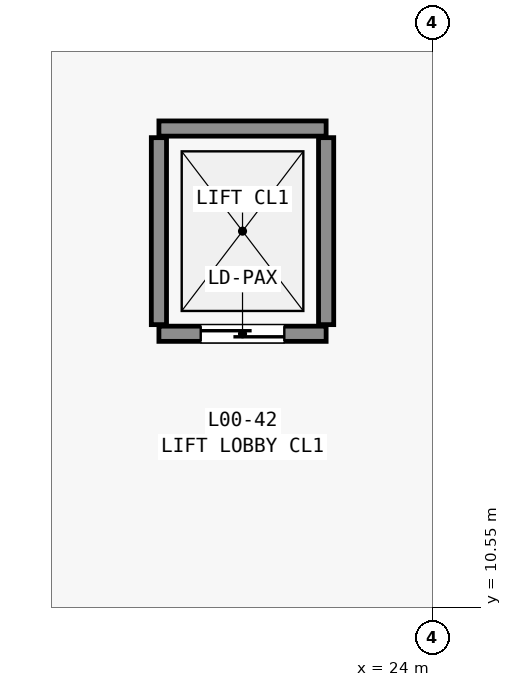
"""IFC4 building model, lengths in metres.
Left out: names, types, materials, properties, quantities, classifications, styles, units other than length and angle.
Written with IfcOpenShell. Run it as: python <this file> out.ifc"""

import sys

from ifc_helpers import new_model, si_unit, direction, frame, frame_2d, origin, place, context, subcontext, project, spatial, rectangle, extrude, element, fill, save


model = new_model("IFC4")
c1 = context("Model", 3, precision=1e-05, world=origin(), true_north=direction((0.0, 1.0)))
c2 = subcontext(c1, "Body", "Model", "MODEL_VIEW")
j1 = project(units=[si_unit("LENGTHUNIT", "METRE"), si_unit("PLANEANGLEUNIT", "RADIAN")], contexts=[c1])
p1 = place(None, origin())
s1 = spatial("IfcSite", under=j1, at=p1, CompositionType="ELEMENT")
p2 = place(p1, origin())
s2 = spatial("IfcBuilding", under=s1, at=p2, CompositionType="ELEMENT")
p3 = place(p2, origin())
s3 = spatial("IfcBuildingStorey", under=s2, at=p3, CompositionType="ELEMENT", Elevation=0.0)
p4 = place(p3, frame((20.4, 14.15, 0.0), z_axis=(0.0, 0.0, 1.0), x_axis=(1.0, 0.0, 0.0)))
e1 = element("IfcWall", 1, at=p4, inside=s3, PredefinedType="STANDARD", context=c2, shape_type="SweptSolid", body=[
    extrude(rectangle(XDim=2.2, YDim=0.2, at=frame_2d((1.1, 0.0))), origin(), (0.0, 0.0, 1.0), 5.64),
])
p5 = place(p4, frame((0.55, 0.0, 0.0)))
e2 = element("IfcOpeningElement", 2, at=p5, cuts=e1, PredefinedType="OPENING", context=c2, shape_type="SweptSolid", body=[
    extrude(rectangle(XDim=1.1, YDim=2.15, at=frame_2d((0.55, 1.075))), frame((0.0, 0.11, 0.0), z_axis=(0.0, -1.0, 0.0), x_axis=(1.0, 0.0, 0.0)), (0.0, 0.0, 1.0), 0.22),
])
p6 = place(p3, frame((20.4, 16.85, 0.0), z_axis=(0.0, 0.0, 1.0), x_axis=(1.0, 0.0, 0.0)))
e3 = element("IfcWall", 3, at=p6, inside=s3, PredefinedType="STANDARD", context=c2, shape_type="SweptSolid", body=[
    extrude(rectangle(XDim=2.2, YDim=0.2, at=frame_2d((1.1, 0.0))), origin(), (0.0, 0.0, 1.0), 5.64),
])
for number, where, z_axis, x_axis in (
    (4, (20.4, 14.27, 0.0), (0.0, 0.0, 1.0), (0.0, 1.0, 0.0)),
    (5, (22.6, 14.27, 0.0), (0.0, 0.0, 1.0), (0.0, 1.0, 0.0)),
):
    element("IfcWall", number, at=place(p3, frame(where, z_axis=z_axis, x_axis=x_axis)), inside=s3, PredefinedType="STANDARD", context=c2, shape_type="SweptSolid", body=[
        extrude(rectangle(XDim=2.46, YDim=0.2, at=frame_2d((1.23, 0.0))), origin(), (0.0, 0.0, 1.0), 5.64),
    ])
p7 = place(p5, origin())
e6 = element("IfcDoor", 6, at=p7, inside=s3, OperationType="SLIDING_TO_LEFT", PredefinedType="DOOR", context=c2, shape_type="SweptSolid", body=[
    extrude(rectangle(XDim=1.1, YDim=2.15, at=frame_2d((0.55, 1.075))), frame((0.0, 0.025, 0.0), z_axis=(0.0, -1.0, 0.0), x_axis=(1.0, 0.0, 0.0)), (0.0, 0.0, 1.0), 0.05),
])
fill(e2, e6)
save(model, sys.argv[1])
